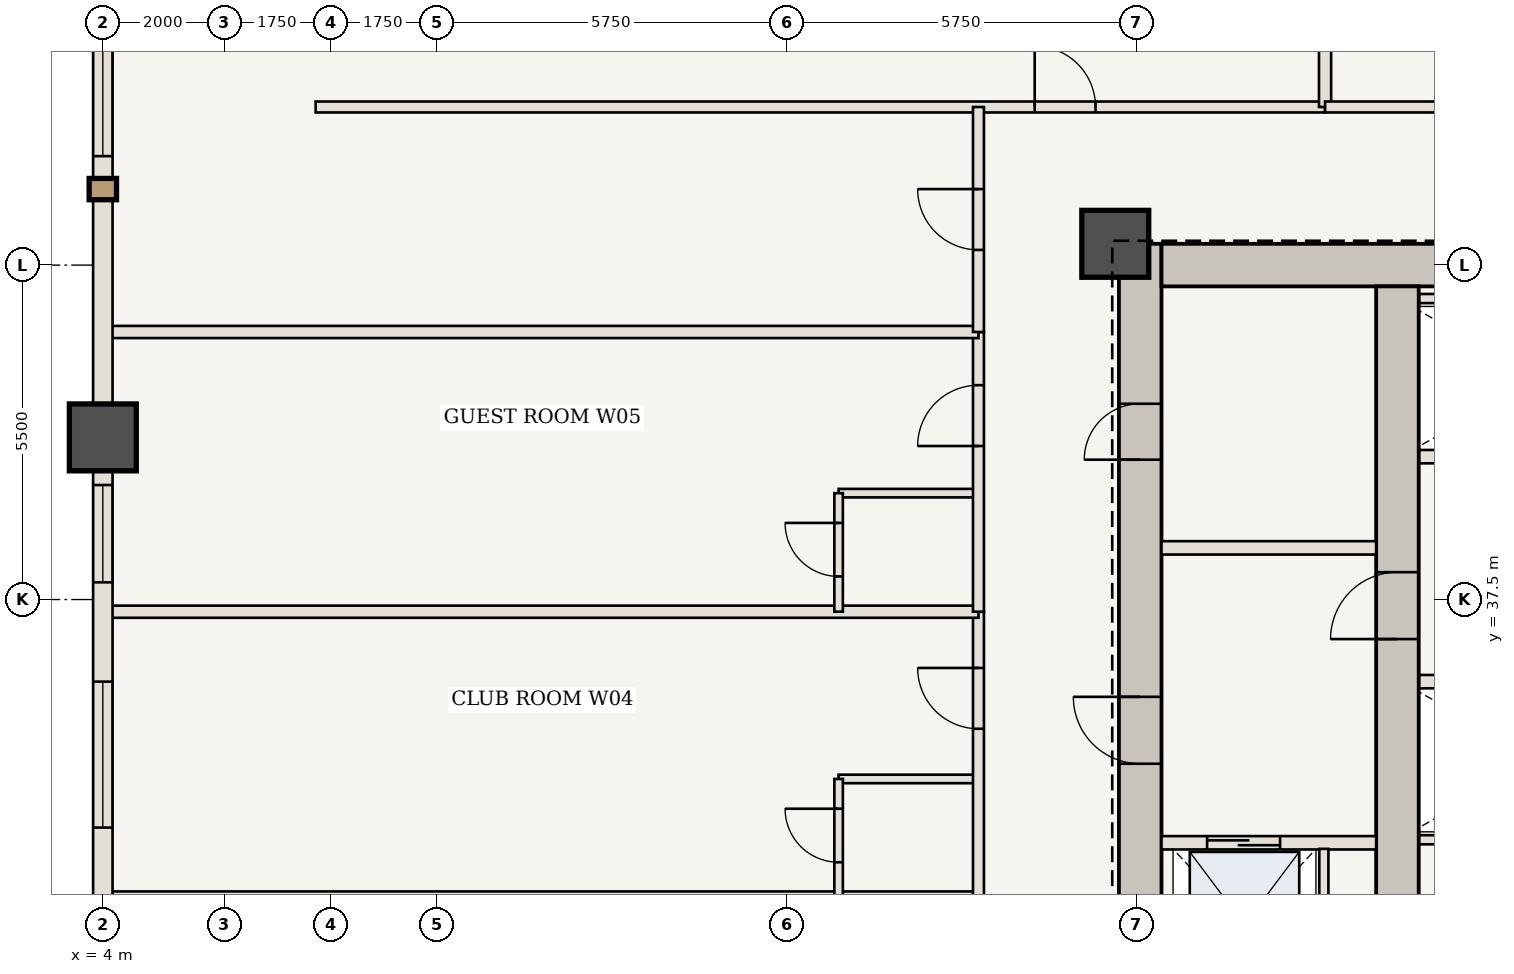
"""IFC4 building model, lengths in metres.
Left out: names, types, materials, properties, quantities, classifications, styles, units other than length and angle.
Written with IfcOpenShell. Run it as: python <this file> out.ifc"""

import sys

from ifc_helpers import new_model, si_unit, direction, frame, frame_2d, origin, origin_2d, place, context, subcontext, project, spatial, rectangle, extrude, element, fill, save


model = new_model("IFC4")
c1 = context("Model", 3, precision=1e-05, world=origin(), true_north=direction((0.0, 1.0)))
c2 = subcontext(c1, "Body", "Model", "MODEL_VIEW")
j1 = project(units=[si_unit("LENGTHUNIT", "METRE"), si_unit("PLANEANGLEUNIT", "RADIAN")], contexts=[c1])
p1 = place(None, origin())
s1 = spatial("IfcSite", under=j1, at=p1, CompositionType="ELEMENT")
p2 = place(p1, origin())
s2 = spatial("IfcBuilding", under=s1, at=p2, CompositionType="ELEMENT")
p3 = place(p2, frame((0.0, 0.0, 38.85)))
s3 = spatial("IfcBuildingStorey", under=s2, at=p3, CompositionType="ELEMENT", Elevation=38.85)
p4 = place(p3, frame((21.06, 30.6, 0.0), z_axis=(0.0, 0.0, 1.0), x_axis=(0.0, 1.0, 0.0)))
e1 = element("IfcWall", 1, at=p4, inside=s3, PredefinedType="SHEAR", context=c2, shape_type="SweptSolid", body=[
    extrude(rectangle(XDim=12.75, YDim=0.7, at=frame_2d((6.375, 0.0))), origin(), (0.0, 0.0, 1.0), 3.5),
])
p5 = place(p4, frame((4.2, 0.0, 0.0)))
e2 = element("IfcOpeningElement", 2, at=p5, cuts=e1, PredefinedType="OPENING", context=c2, shape_type="SweptSolid", body=[
    extrude(rectangle(XDim=1.1, YDim=2.15, at=frame_2d((0.55, 1.075))), frame((0.0, 0.36, 0.0), z_axis=(0.0, -1.0, 0.0), x_axis=(1.0, 0.0, 0.0)), (0.0, 0.0, 1.0), 0.72),
])
p6 = place(p4, frame((9.2, 0.0, 0.0)))
e3 = element("IfcOpeningElement", 3, at=p6, cuts=e1, PredefinedType="OPENING", context=c2, shape_type="SweptSolid", body=[
    extrude(rectangle(XDim=0.92, YDim=2.1, at=frame_2d((0.46, 1.05))), frame((0.0, 0.36, 0.0), z_axis=(0.0, -1.0, 0.0), x_axis=(1.0, 0.0, 0.0)), (0.0, 0.0, 1.0), 0.72),
])
p7 = place(p3, frame((21.41, 43.0, 0.0), z_axis=(0.0, 0.0, 1.0), x_axis=(1.0, 0.0, 0.0)))
e4 = element("IfcWall", 4, at=p7, inside=s3, PredefinedType="SHEAR", context=c2, shape_type="SweptSolid", body=[
    extrude(rectangle(XDim=8.24, YDim=0.7, at=frame_2d((4.12, 0.0))), origin(), (0.0, 0.0, 1.0), 3.5),
])
p8 = place(p3, frame((25.29, 30.6, 0.0), z_axis=(0.0, 0.0, 1.0), x_axis=(0.0, 1.0, 0.0)))
e5 = element("IfcWall", 5, at=p8, inside=s3, PredefinedType="SHEAR", context=c2, shape_type="SweptSolid", body=[
    extrude(rectangle(XDim=12.05, YDim=0.7, at=frame_2d((6.025, 0.0))), origin(), (0.0, 0.0, 1.0), 3.5),
])
p9 = place(p8, frame((6.25, 0.0, 0.0)))
e6 = element("IfcOpeningElement", 6, at=p9, cuts=e5, PredefinedType="OPENING", context=c2, shape_type="SweptSolid", body=[
    extrude(rectangle(XDim=1.1, YDim=2.15, at=frame_2d((0.55, 1.075))), frame((0.0, 0.36, 0.0), z_axis=(0.0, -1.0, 0.0), x_axis=(1.0, 0.0, 0.0)), (0.0, 0.0, 1.0), 0.72),
])
for number, where, z_axis, x_axis in (
    (7, (20.65, 43.35, 0.0), (0.0, 0.0, 1.0), (1.0, 0.0, 0.0)),
    (8, (4.0, 40.167, 0.0), (0.0, 0.0, 1.0), (1.0, 0.0, 0.0)),
):
    element("IfcColumn", number, at=place(p3, frame(where, z_axis=z_axis, x_axis=x_axis)), inside=s3, PredefinedType="COLUMN", context=c2, shape_type="SweptSolid", body=[
        extrude(rectangle(XDim=1.1, YDim=1.1, at=origin_2d()), origin(), (0.0, 0.0, 1.0), 3.5),
    ])
p10 = place(p3, frame((21.41, 33.5, 0.0), z_axis=(0.0, 0.0, 1.0), x_axis=(1.0, 0.0, 0.0)))
e9 = element("IfcWall", 9, at=p10, inside=s3, PredefinedType="STANDARD", context=c2, shape_type="SweptSolid", body=[
    extrude(rectangle(XDim=3.53, YDim=0.22, at=frame_2d((1.765, 0.0))), origin(), (0.0, 0.0, 1.0), 3.08),
])
p11 = place(p10, frame((0.75, 0.0, 0.0)))
e10 = element("IfcOpeningElement", 10, at=p11, cuts=e9, PredefinedType="OPENING", context=c2, shape_type="SweptSolid", body=[
    extrude(rectangle(XDim=1.2, YDim=2.2, at=frame_2d((0.6, 1.1))), frame((0.0, 0.12, 0.0), z_axis=(0.0, -1.0, 0.0), x_axis=(1.0, 0.0, 0.0)), (0.0, 0.0, 1.0), 0.24),
])
p12 = place(p3, frame((24.08, 30.75, 0.0), z_axis=(0.0, 0.0, 1.0), x_axis=(0.0, 1.0, 0.0)))
e11 = element("IfcWall", 11, at=p12, inside=s3, PredefinedType="STANDARD", context=c2, shape_type="SweptSolid", body=[
    extrude(rectangle(XDim=2.65, YDim=0.15, at=frame_2d((1.325, 0.0))), origin(), (0.0, 0.0, 1.0), 3.08),
])
p13 = place(p3, frame((21.41, 38.35, 0.0), z_axis=(0.0, 0.0, 1.0), x_axis=(1.0, 0.0, 0.0)))
e12 = element("IfcWall", 12, at=p13, inside=s3, PredefinedType="STANDARD", context=c2, shape_type="SweptSolid", body=[
    extrude(rectangle(XDim=3.53, YDim=0.22, at=frame_2d((1.765, 0.0))), origin(), (0.0, 0.0, 1.0), 3.08),
])
p14 = place(p3, frame((25.65, 36.15, 0.0), z_axis=(0.0, 0.0, 1.0), x_axis=(1.0, 0.0, 0.0)))
e13 = element("IfcWall", 13, at=p14, inside=s3, PredefinedType="STANDARD", context=c2, shape_type="SweptSolid", body=[
    extrude(rectangle(XDim=4.3, YDim=0.22, at=frame_2d((2.15, 0.0))), origin(), (0.0, 0.0, 1.0), 3.08),
])
p15 = place(p3, frame((25.65, 33.55, 0.0), z_axis=(0.0, 0.0, 1.0), x_axis=(1.0, 0.0, 0.0)))
e14 = element("IfcWall", 14, at=p15, inside=s3, PredefinedType="STANDARD", context=c2, shape_type="SweptSolid", body=[
    extrude(rectangle(XDim=4.2, YDim=0.15, at=frame_2d((2.1, 0.0))), origin(), (0.0, 0.0, 1.0), 3.08),
])
p16 = place(p3, frame((25.65, 39.85, 0.0), z_axis=(0.0, 0.0, 1.0), x_axis=(1.0, 0.0, 0.0)))
e15 = element("IfcWall", 15, at=p16, inside=s3, PredefinedType="STANDARD", context=c2, shape_type="SweptSolid", body=[
    extrude(rectangle(XDim=4.3, YDim=0.22, at=frame_2d((2.15, 0.0))), origin(), (0.0, 0.0, 1.0), 3.08),
])
p17 = place(p3, frame((25.65, 42.45, 0.0), z_axis=(0.0, 0.0, 1.0), x_axis=(1.0, 0.0, 0.0)))
e16 = element("IfcWall", 16, at=p17, inside=s3, PredefinedType="STANDARD", context=c2, shape_type="SweptSolid", body=[
    extrude(rectangle(XDim=4.2, YDim=0.15, at=frame_2d((2.1, 0.0))), origin(), (0.0, 0.0, 1.0), 3.08),
])
p18 = place(p3, frame((7.5, 45.6, 0.0), z_axis=(0.0, 0.0, 1.0), x_axis=(1.0, 0.0, 0.0)))
e17 = element("IfcWall", 17, at=p18, inside=s3, PredefinedType="STANDARD", context=c2, shape_type="SweptSolid", body=[
    extrude(rectangle(XDim=16.6, YDim=0.18, at=frame_2d((8.3, 0.0))), origin(), (0.0, 0.0, 1.0), 3.08),
])
p19 = place(p18, frame((11.825, 0.0, 0.0)))
e18 = element("IfcOpeningElement", 18, at=p19, cuts=e17, PredefinedType="OPENING", context=c2, shape_type="SweptSolid", body=[
    extrude(rectangle(XDim=1.0, YDim=2.15, at=frame_2d((0.5, 1.075))), frame((0.0, 0.1, 0.0), z_axis=(0.0, -1.0, 0.0), x_axis=(1.0, 0.0, 0.0)), (0.0, 0.0, 1.0), 0.2),
])
p20 = place(p3, frame((24.1, 45.6, 0.0), z_axis=(0.0, 0.0, 1.0), x_axis=(0.0, 1.0, 0.0)))
e19 = element("IfcWall", 19, at=p20, inside=s3, PredefinedType="STANDARD", context=c2, shape_type="SweptSolid", body=[
    extrude(rectangle(XDim=14.34, YDim=0.2, at=frame_2d((7.17, 0.0))), origin(), (0.0, 0.0, 1.0), 3.08),
])
p21 = place(p3, frame((24.1, 45.6, 0.0), z_axis=(0.0, 0.0, 1.0), x_axis=(1.0, 0.0, 0.0)))
e20 = element("IfcWall", 20, at=p21, inside=s3, PredefinedType="STANDARD", context=c2, shape_type="SweptSolid", body=[
    extrude(rectangle(XDim=4.7, YDim=0.18, at=frame_2d((2.35, 0.0))), origin(), (0.0, 0.0, 1.0), 3.08),
])
p22 = place(p21, frame((2.775, 0.0, 0.0)))
e21 = element("IfcOpeningElement", 21, at=p22, cuts=e20, PredefinedType="OPENING", context=c2, shape_type="SweptSolid", body=[
    extrude(rectangle(XDim=1.0, YDim=2.15, at=frame_2d((0.5, 1.075))), frame((0.0, 0.1, 0.0), z_axis=(0.0, -1.0, 0.0), x_axis=(1.0, 0.0, 0.0)), (0.0, 0.0, 1.0), 0.2),
])
p23 = place(p3, frame((4.06, 32.6, 0.0), z_axis=(0.0, 0.0, 1.0), x_axis=(1.0, 0.0, 0.0)))
e22 = element("IfcWall", 22, at=p23, inside=s3, PredefinedType="STANDARD", context=c2, shape_type="SweptSolid", body=[
    extrude(rectangle(XDim=14.34, YDim=0.2, at=frame_2d((7.17, 0.0))), origin(), (0.0, 0.0, 1.0), 3.08),
])
p24 = place(p3, frame((16.1, 34.55, 0.0), z_axis=(0.0, 0.0, 1.0), x_axis=(1.0, 0.0, 0.0)))
e23 = element("IfcWall", 23, at=p24, inside=s3, PredefinedType="STANDARD", context=c2, shape_type="SweptSolid", body=[
    extrude(rectangle(XDim=2.3, YDim=0.14, at=frame_2d((1.15, 0.0))), origin(), (0.0, 0.0, 1.0), 3.08),
])
p25 = place(p3, frame((16.1, 32.6, 0.0), z_axis=(0.0, 0.0, 1.0), x_axis=(0.0, 1.0, 0.0)))
e24 = element("IfcWall", 24, at=p25, inside=s3, PredefinedType="STANDARD", context=c2, shape_type="SweptSolid", body=[
    extrude(rectangle(XDim=1.95, YDim=0.14, at=frame_2d((0.975, 0.0))), origin(), (0.0, 0.0, 1.0), 3.08),
])
p26 = place(p25, frame((0.58, 0.0, 0.0)))
e25 = element("IfcOpeningElement", 25, at=p26, cuts=e24, PredefinedType="OPENING", context=c2, shape_type="SweptSolid", body=[
    extrude(rectangle(XDim=0.88, YDim=2.1, at=frame_2d((0.44, 1.05))), frame((0.0, 0.08, 0.0), z_axis=(0.0, -1.0, 0.0), x_axis=(1.0, 0.0, 0.0)), (0.0, 0.0, 1.0), 0.16),
])
p27 = place(p3, frame((18.4, 32.6, 0.0), z_axis=(0.0, 0.0, 1.0), x_axis=(0.0, 1.0, 0.0)))
e26 = element("IfcWall", 26, at=p27, inside=s3, PredefinedType="STANDARD", context=c2, shape_type="SweptSolid", body=[
    extrude(rectangle(XDim=4.7, YDim=0.18, at=frame_2d((2.35, 0.0))), origin(), (0.0, 0.0, 1.0), 3.08),
])
p28 = place(p27, frame((2.775, 0.0, 0.0)))
e27 = element("IfcOpeningElement", 27, at=p28, cuts=e26, PredefinedType="OPENING", context=c2, shape_type="SweptSolid", body=[
    extrude(rectangle(XDim=1.0, YDim=2.15, at=frame_2d((0.5, 1.075))), frame((0.0, 0.1, 0.0), z_axis=(0.0, -1.0, 0.0), x_axis=(1.0, 0.0, 0.0)), (0.0, 0.0, 1.0), 0.2),
])
p29 = place(p3, frame((4.06, 37.3, 0.0), z_axis=(0.0, 0.0, 1.0), x_axis=(1.0, 0.0, 0.0)))
e28 = element("IfcWall", 28, at=p29, inside=s3, PredefinedType="STANDARD", context=c2, shape_type="SweptSolid", body=[
    extrude(rectangle(XDim=14.34, YDim=0.2, at=frame_2d((7.17, 0.0))), origin(), (0.0, 0.0, 1.0), 3.08),
])
p30 = place(p3, frame((16.1, 39.25, 0.0), z_axis=(0.0, 0.0, 1.0), x_axis=(1.0, 0.0, 0.0)))
e29 = element("IfcWall", 29, at=p30, inside=s3, PredefinedType="STANDARD", context=c2, shape_type="SweptSolid", body=[
    extrude(rectangle(XDim=2.3, YDim=0.14, at=frame_2d((1.15, 0.0))), origin(), (0.0, 0.0, 1.0), 3.08),
])
p31 = place(p3, frame((16.1, 37.3, 0.0), z_axis=(0.0, 0.0, 1.0), x_axis=(0.0, 1.0, 0.0)))
e30 = element("IfcWall", 30, at=p31, inside=s3, PredefinedType="STANDARD", context=c2, shape_type="SweptSolid", body=[
    extrude(rectangle(XDim=1.95, YDim=0.14, at=frame_2d((0.975, 0.0))), origin(), (0.0, 0.0, 1.0), 3.08),
])
p32 = place(p31, frame((0.58, 0.0, 0.0)))
e31 = element("IfcOpeningElement", 31, at=p32, cuts=e30, PredefinedType="OPENING", context=c2, shape_type="SweptSolid", body=[
    extrude(rectangle(XDim=0.88, YDim=2.1, at=frame_2d((0.44, 1.05))), frame((0.0, 0.08, 0.0), z_axis=(0.0, -1.0, 0.0), x_axis=(1.0, 0.0, 0.0)), (0.0, 0.0, 1.0), 0.16),
])
p33 = place(p3, frame((18.4, 37.3, 0.0), z_axis=(0.0, 0.0, 1.0), x_axis=(0.0, 1.0, 0.0)))
e32 = element("IfcWall", 32, at=p33, inside=s3, PredefinedType="STANDARD", context=c2, shape_type="SweptSolid", body=[
    extrude(rectangle(XDim=4.6, YDim=0.18, at=frame_2d((2.3, 0.0))), origin(), (0.0, 0.0, 1.0), 3.08),
])
p34 = place(p33, frame((2.725, 0.0, 0.0)))
e33 = element("IfcOpeningElement", 33, at=p34, cuts=e32, PredefinedType="OPENING", context=c2, shape_type="SweptSolid", body=[
    extrude(rectangle(XDim=1.0, YDim=2.15, at=frame_2d((0.5, 1.075))), frame((0.0, 0.1, 0.0), z_axis=(0.0, -1.0, 0.0), x_axis=(1.0, 0.0, 0.0)), (0.0, 0.0, 1.0), 0.2),
])
p35 = place(p3, frame((4.06, 41.9, 0.0), z_axis=(0.0, 0.0, 1.0), x_axis=(1.0, 0.0, 0.0)))
e34 = element("IfcWall", 34, at=p35, inside=s3, PredefinedType="STANDARD", context=c2, shape_type="SweptSolid", body=[
    extrude(rectangle(XDim=14.34, YDim=0.2, at=frame_2d((7.17, 0.0))), origin(), (0.0, 0.0, 1.0), 3.08),
])
p36 = place(p3, frame((18.4, 41.9, 0.0), z_axis=(0.0, 0.0, 1.0), x_axis=(0.0, 1.0, 0.0)))
e35 = element("IfcWall", 35, at=p36, inside=s3, PredefinedType="STANDARD", context=c2, shape_type="SweptSolid", body=[
    extrude(rectangle(XDim=3.7, YDim=0.18, at=frame_2d((1.85, 0.0))), origin(), (0.0, 0.0, 1.0), 3.08),
])
p37 = place(p36, frame((1.35, 0.0, 0.0)))
e36 = element("IfcOpeningElement", 36, at=p37, cuts=e35, PredefinedType="OPENING", context=c2, shape_type="SweptSolid", body=[
    extrude(rectangle(XDim=1.0, YDim=2.15, at=frame_2d((0.5, 1.075))), frame((0.0, 0.1, 0.0), z_axis=(0.0, -1.0, 0.0), x_axis=(1.0, 0.0, 0.0)), (0.0, 0.0, 1.0), 0.2),
])
p38 = place(p3, frame((4.0, 32.0, 0.0), z_axis=(0.0, 0.0, 1.0), x_axis=(0.0, 1.0, 0.0)))
e37 = element("IfcWall", 37, at=p38, inside=s3, PredefinedType="USERDEFINED", context=c2, shape_type="SweptSolid", body=[
    extrude(rectangle(XDim=8.167, YDim=0.32, at=frame_2d((4.083, 0.0))), origin(), (0.0, 0.0, 1.0), 2.28),
])
p39 = place(p38, frame((1.75, 0.0, 0.85)))
e38 = element("IfcOpeningElement", 38, at=p39, cuts=e37, PredefinedType="OPENING", context=c2, shape_type="SweptSolid", body=[
    extrude(rectangle(XDim=2.4, YDim=1.23, at=frame_2d((1.2, 0.615))), frame((0.0, 0.17, 0.0), z_axis=(0.0, -1.0, 0.0), x_axis=(1.0, 0.0, 0.0)), (0.0, 0.0, 1.0), 0.34),
])
p40 = place(p38, frame((5.783, 0.0, 0.85)))
e39 = element("IfcOpeningElement", 39, at=p40, cuts=e37, PredefinedType="OPENING", context=c2, shape_type="SweptSolid", body=[
    extrude(rectangle(XDim=1.6, YDim=1.23, at=frame_2d((0.8, 0.615))), frame((0.0, 0.17, 0.0), z_axis=(0.0, -1.0, 0.0), x_axis=(1.0, 0.0, 0.0)), (0.0, 0.0, 1.0), 0.34),
])
p41 = place(p3, frame((4.0, 40.167, 0.0), z_axis=(0.0, 0.0, 1.0), x_axis=(0.0, 1.0, 0.0)))
e40 = element("IfcWall", 40, at=p41, inside=s3, PredefinedType="USERDEFINED", context=c2, shape_type="SweptSolid", body=[
    extrude(rectangle(XDim=8.167, YDim=0.32, at=frame_2d((4.083, 0.0))), origin(), (0.0, 0.0, 1.0), 2.28),
])
p42 = place(p41, frame((4.625, 0.0, 0.85)))
e41 = element("IfcOpeningElement", 41, at=p42, cuts=e40, PredefinedType="OPENING", context=c2, shape_type="SweptSolid", body=[
    extrude(rectangle(XDim=2.8, YDim=1.23, at=frame_2d((1.4, 0.615))), frame((0.0, 0.17, 0.0), z_axis=(0.0, -1.0, 0.0), x_axis=(1.0, 0.0, 0.0)), (0.0, 0.0, 1.0), 0.34),
])
p43 = place(p5, origin())
e42 = element("IfcDoor", 42, at=p43, inside=s3, OperationType="SINGLE_SWING_RIGHT", PredefinedType="DOOR", context=c2, shape_type="SweptSolid", body=[
    extrude(rectangle(XDim=1.1, YDim=2.15, at=frame_2d((0.55, 1.075))), frame((0.0, 0.025, 0.0), z_axis=(0.0, -1.0, 0.0), x_axis=(1.0, 0.0, 0.0)), (0.0, 0.0, 1.0), 0.05),
])
fill(e2, e42)
p44 = place(p9, origin())
e43 = element("IfcDoor", 43, at=p44, inside=s3, OperationType="SINGLE_SWING_LEFT", PredefinedType="DOOR", context=c2, shape_type="SweptSolid", body=[
    extrude(rectangle(XDim=1.1, YDim=2.15, at=frame_2d((0.55, 1.075))), frame((0.0, 0.025, 0.0), z_axis=(0.0, -1.0, 0.0), x_axis=(1.0, 0.0, 0.0)), (0.0, 0.0, 1.0), 0.05),
])
fill(e6, e43)
p45 = place(p6, origin())
e44 = element("IfcDoor", 44, at=p45, inside=s3, OperationType="SINGLE_SWING_LEFT", PredefinedType="DOOR", context=c2, shape_type="SweptSolid", body=[
    extrude(rectangle(XDim=0.92, YDim=2.1, at=frame_2d((0.46, 1.05))), frame((0.0, 0.025, 0.0), z_axis=(0.0, -1.0, 0.0), x_axis=(1.0, 0.0, 0.0)), (0.0, 0.0, 1.0), 0.05),
])
fill(e3, e44)
p46 = place(p11, origin())
e45 = element("IfcDoor", 45, at=p46, inside=s3, OperationType="DOUBLE_DOOR_SLIDING", PredefinedType="DOOR", context=c2, shape_type="SweptSolid", body=[
    extrude(rectangle(XDim=1.2, YDim=2.2, at=frame_2d((0.6, 1.1))), frame((0.0, 0.025, 0.0), z_axis=(0.0, -1.0, 0.0), x_axis=(1.0, 0.0, 0.0)), (0.0, 0.0, 1.0), 0.05),
])
fill(e10, e45)
p47 = place(p19, origin())
e46 = element("IfcDoor", 46, at=p47, inside=s3, OperationType="SINGLE_SWING_LEFT", PredefinedType="DOOR", context=c2, shape_type="SweptSolid", body=[
    extrude(rectangle(XDim=1.0, YDim=2.15, at=frame_2d((0.5, 1.075))), frame((0.0, 0.025, 0.0), z_axis=(0.0, -1.0, 0.0), x_axis=(1.0, 0.0, 0.0)), (0.0, 0.0, 1.0), 0.05),
])
fill(e18, e46)
p48 = place(p26, origin())
e47 = element("IfcDoor", 47, at=p48, inside=s3, OperationType="SINGLE_SWING_RIGHT", PredefinedType="DOOR", context=c2, shape_type="SweptSolid", body=[
    extrude(rectangle(XDim=0.88, YDim=2.1, at=frame_2d((0.44, 1.05))), frame((0.0, 0.025, 0.0), z_axis=(0.0, -1.0, 0.0), x_axis=(1.0, 0.0, 0.0)), (0.0, 0.0, 1.0), 0.05),
])
fill(e25, e47)
p49 = place(p28, origin())
e48 = element("IfcDoor", 48, at=p49, inside=s3, OperationType="SINGLE_SWING_RIGHT", PredefinedType="DOOR", context=c2, shape_type="SweptSolid", body=[
    extrude(rectangle(XDim=1.0, YDim=2.15, at=frame_2d((0.5, 1.075))), frame((0.0, 0.025, 0.0), z_axis=(0.0, -1.0, 0.0), x_axis=(1.0, 0.0, 0.0)), (0.0, 0.0, 1.0), 0.05),
])
fill(e27, e48)
p50 = place(p32, origin())
e49 = element("IfcDoor", 49, at=p50, inside=s3, OperationType="SINGLE_SWING_RIGHT", PredefinedType="DOOR", context=c2, shape_type="SweptSolid", body=[
    extrude(rectangle(XDim=0.88, YDim=2.1, at=frame_2d((0.44, 1.05))), frame((0.0, 0.025, 0.0), z_axis=(0.0, -1.0, 0.0), x_axis=(1.0, 0.0, 0.0)), (0.0, 0.0, 1.0), 0.05),
])
fill(e31, e49)
p51 = place(p34, origin())
e50 = element("IfcDoor", 50, at=p51, inside=s3, OperationType="SINGLE_SWING_LEFT", PredefinedType="DOOR", context=c2, shape_type="SweptSolid", body=[
    extrude(rectangle(XDim=1.0, YDim=2.15, at=frame_2d((0.5, 1.075))), frame((0.0, 0.025, 0.0), z_axis=(0.0, -1.0, 0.0), x_axis=(1.0, 0.0, 0.0)), (0.0, 0.0, 1.0), 0.05),
])
fill(e33, e50)
p52 = place(p37, origin())
e51 = element("IfcDoor", 51, at=p52, inside=s3, OperationType="SINGLE_SWING_RIGHT", PredefinedType="DOOR", context=c2, shape_type="SweptSolid", body=[
    extrude(rectangle(XDim=1.0, YDim=2.15, at=frame_2d((0.5, 1.075))), frame((0.0, 0.025, 0.0), z_axis=(0.0, -1.0, 0.0), x_axis=(1.0, 0.0, 0.0)), (0.0, 0.0, 1.0), 0.05),
])
fill(e36, e51)
p53 = place(p39, origin())
e52 = element("IfcWindow", 52, at=p53, inside=s3, PartitioningType="SINGLE_PANEL", PredefinedType="WINDOW", context=c2, shape_type="SweptSolid", body=[
    extrude(rectangle(XDim=2.4, YDim=1.23, at=frame_2d((1.2, 0.615))), frame((0.0, 0.03, 0.0), z_axis=(0.0, -1.0, 0.0), x_axis=(1.0, 0.0, 0.0)), (0.0, 0.0, 1.0), 0.06),
])
fill(e38, e52)
p54 = place(p40, origin())
e53 = element("IfcWindow", 53, at=p54, inside=s3, PartitioningType="SINGLE_PANEL", PredefinedType="WINDOW", context=c2, shape_type="SweptSolid", body=[
    extrude(rectangle(XDim=1.6, YDim=1.23, at=frame_2d((0.8, 0.615))), frame((0.0, 0.03, 0.0), z_axis=(0.0, -1.0, 0.0), x_axis=(1.0, 0.0, 0.0)), (0.0, 0.0, 1.0), 0.06),
])
fill(e39, e53)
p55 = place(p42, origin())
e54 = element("IfcWindow", 54, at=p55, inside=s3, PartitioningType="SINGLE_PANEL", PredefinedType="WINDOW", context=c2, shape_type="SweptSolid", body=[
    extrude(rectangle(XDim=2.8, YDim=1.23, at=frame_2d((1.4, 0.615))), frame((0.0, 0.03, 0.0), z_axis=(0.0, -1.0, 0.0), x_axis=(1.0, 0.0, 0.0)), (0.0, 0.0, 1.0), 0.06),
])
fill(e41, e54)
save(model, sys.argv[1])
